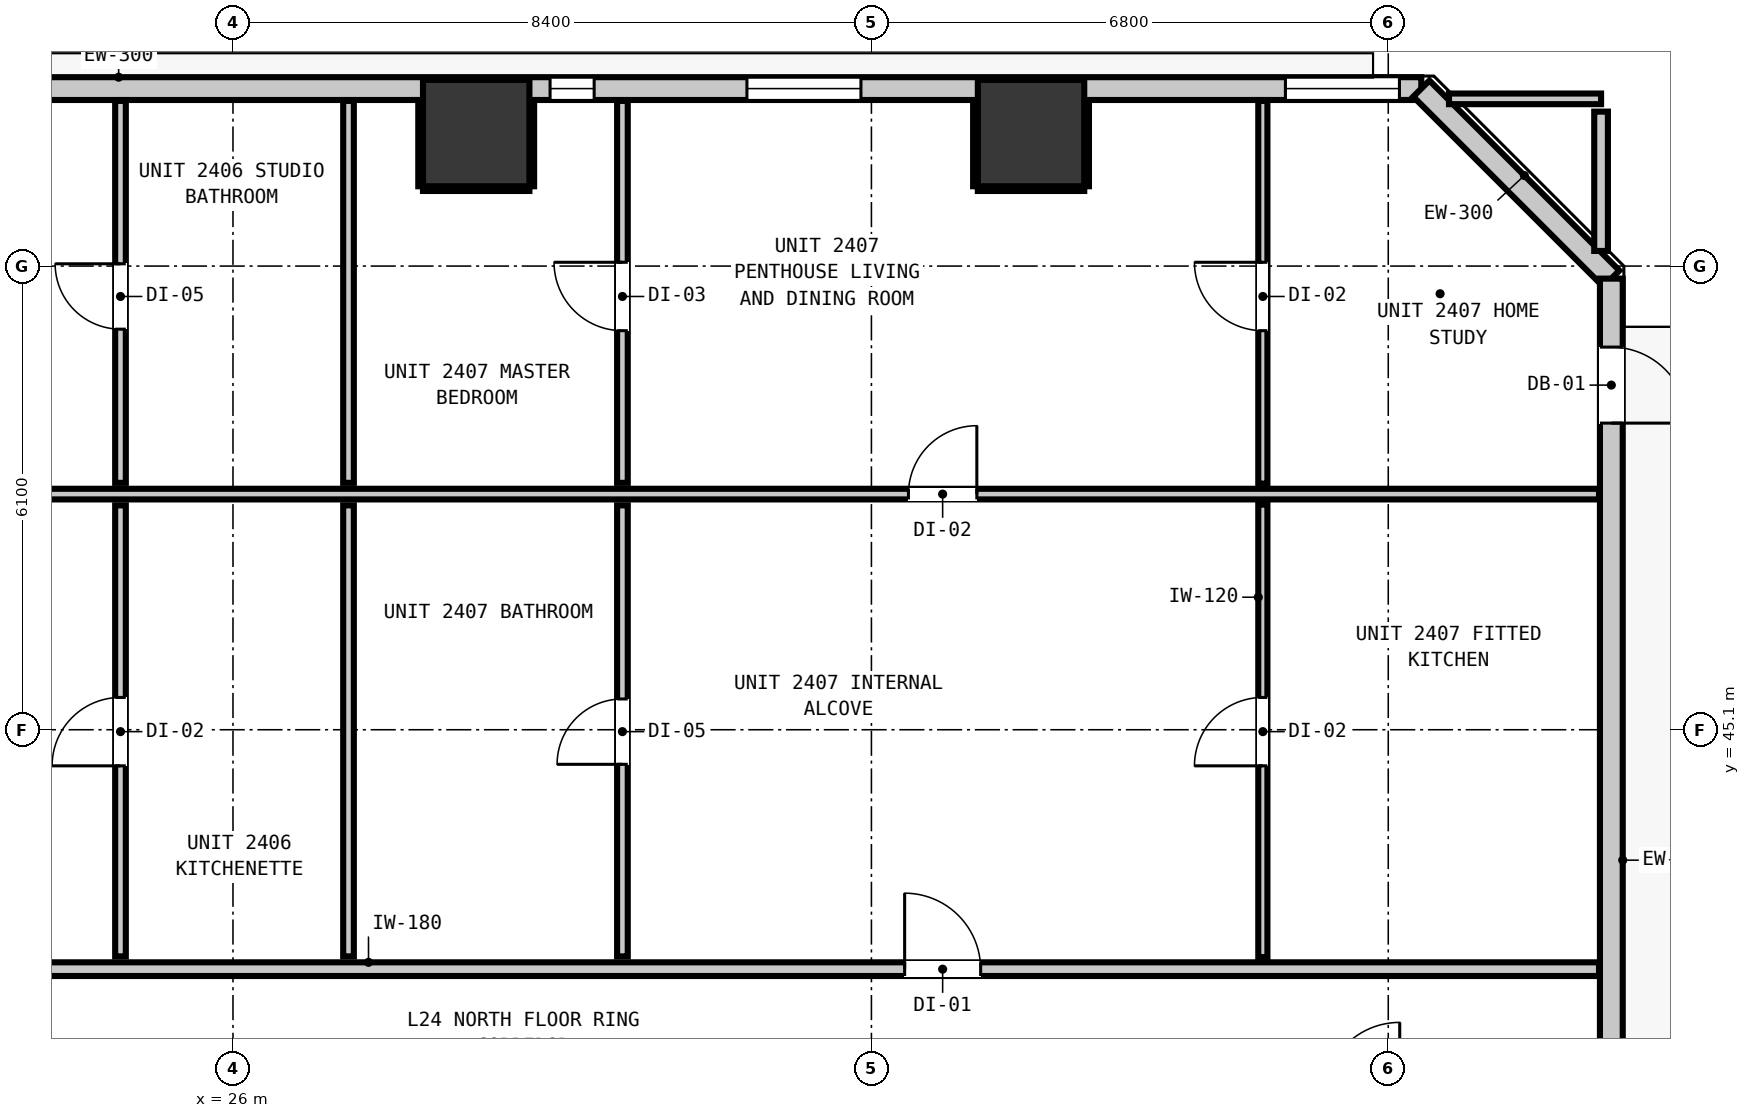
"""IFC4 building model, lengths in metres.
Left out: names, types, materials, properties, quantities, classifications, styles, units other than length and angle.
Written with IfcOpenShell. Run it as: python <this file> out.ifc"""

import sys

from ifc_helpers import new_model, si_unit, direction, frame, frame_2d, origin, origin_2d, place, context, subcontext, project, spatial, rectangle, extrude, element, fill, save


model = new_model("IFC4")
c1 = context("Model", 3, precision=1e-05, world=origin(), true_north=direction((0.0, 1.0)))
c2 = subcontext(c1, "Body", "Model", "MODEL_VIEW")
j1 = project(units=[si_unit("LENGTHUNIT", "METRE"), si_unit("PLANEANGLEUNIT", "RADIAN")], contexts=[c1])
p1 = place(None, origin())
s1 = spatial("IfcSite", under=j1, at=p1, CompositionType="ELEMENT")
p2 = place(p1, origin())
s2 = spatial("IfcBuilding", under=s1, at=p2, CompositionType="ELEMENT")
p3 = place(p2, frame((0.0, 0.0, 85.08)))
s3 = spatial("IfcBuildingStorey", under=s2, at=p3, CompositionType="ELEMENT", Elevation=85.08)
for number, where, z_axis, x_axis in (
    (1, (29.2, 52.95, 0.0), (0.0, 0.0, 1.0), (1.0, 0.0, 0.0)),
    (2, (36.5, 52.95, 0.0), (0.0, 0.0, 1.0), (1.0, 0.0, 0.0)),
):
    element("IfcColumn", number, at=place(p3, frame(where, z_axis=z_axis, x_axis=x_axis)), inside=s3, PredefinedType="COLUMN", context=c2, shape_type="SweptSolid", body=[
        extrude(rectangle(XDim=1.4, YDim=1.4, at=origin_2d()), origin(), (0.0, 0.0, 1.0), 3.32),
    ])
p4 = place(p3, frame((4.165, 53.535, 0.0), z_axis=(0.0, 0.0, 1.0), x_axis=(1.0, 0.0, 0.0)))
e3 = element("IfcWall", 3, at=p4, inside=s3, PredefinedType="STANDARD", context=c2, shape_type="SweptSolid", body=[
    extrude(rectangle(XDim=37.47, YDim=0.3, at=frame_2d((18.735, 0.0))), origin(), (0.0, 0.0, 1.0), 2.96),
])
p5 = place(p4, frame((1.951, 0.0, 0.0)))
e4 = element("IfcOpeningElement", 4, at=p5, cuts=e3, PredefinedType="OPENING", context=c2, shape_type="SweptSolid", body=[
    extrude(rectangle(XDim=1.0, YDim=2.15, at=frame_2d((0.5, 1.075))), frame((0.0, 0.16, 0.0), z_axis=(0.0, -1.0, 0.0), x_axis=(1.0, 0.0, 0.0)), (0.0, 0.0, 1.0), 0.32),
])
p6 = place(p4, frame((4.603, 0.0, 0.85)))
e5 = element("IfcOpeningElement", 5, at=p6, cuts=e3, PredefinedType="OPENING", context=c2, shape_type="SweptSolid", body=[
    extrude(rectangle(XDim=1.5, YDim=1.8, at=frame_2d((0.75, 0.9))), frame((0.0, 0.16, 0.0), z_axis=(0.0, -1.0, 0.0), x_axis=(1.0, 0.0, 0.0)), (0.0, 0.0, 1.0), 0.32),
])
p7 = place(p4, frame((0.324, 0.0, 0.85)))
e6 = element("IfcOpeningElement", 6, at=p7, cuts=e3, PredefinedType="OPENING", context=c2, shape_type="SweptSolid", body=[
    extrude(rectangle(XDim=0.58, YDim=1.5, at=frame_2d((0.29, 0.75))), frame((0.0, 0.16, 0.0), z_axis=(0.0, -1.0, 0.0), x_axis=(1.0, 0.0, 0.0)), (0.0, 0.0, 1.0), 0.32),
])
p8 = place(p4, frame((10.279, 0.0, 0.85)))
e7 = element("IfcOpeningElement", 7, at=p8, cuts=e3, PredefinedType="OPENING", context=c2, shape_type="SweptSolid", body=[
    extrude(rectangle(XDim=1.05, YDim=1.65, at=frame_2d((0.525, 0.825))), frame((0.0, 0.16, 0.0), z_axis=(0.0, -1.0, 0.0), x_axis=(1.0, 0.0, 0.0)), (0.0, 0.0, 1.0), 0.32),
])
p9 = place(p4, frame((13.154, 0.0, 0.85)))
e8 = element("IfcOpeningElement", 8, at=p9, cuts=e3, PredefinedType="OPENING", context=c2, shape_type="SweptSolid", body=[
    extrude(rectangle(XDim=1.5, YDim=1.8, at=frame_2d((0.75, 0.9))), frame((0.0, 0.16, 0.0), z_axis=(0.0, -1.0, 0.0), x_axis=(1.0, 0.0, 0.0)), (0.0, 0.0, 1.0), 0.32),
])
p10 = place(p4, frame((28.597, 0.0, 0.85)))
e9 = element("IfcOpeningElement", 9, at=p10, cuts=e3, PredefinedType="OPENING", context=c2, shape_type="SweptSolid", body=[
    extrude(rectangle(XDim=1.5, YDim=1.8, at=frame_2d((0.75, 0.9))), frame((0.0, 0.16, 0.0), z_axis=(0.0, -1.0, 0.0), x_axis=(1.0, 0.0, 0.0)), (0.0, 0.0, 1.0), 0.32),
])
p11 = place(p4, frame((26.007, 0.0, 0.85)))
e10 = element("IfcOpeningElement", 10, at=p11, cuts=e3, PredefinedType="OPENING", context=c2, shape_type="SweptSolid", body=[
    extrude(rectangle(XDim=0.58, YDim=1.5, at=frame_2d((0.29, 0.75))), frame((0.0, 0.16, 0.0), z_axis=(0.0, -1.0, 0.0), x_axis=(1.0, 0.0, 0.0)), (0.0, 0.0, 1.0), 0.32),
])
p12 = place(p4, frame((35.682, 0.0, 0.85)))
e11 = element("IfcOpeningElement", 11, at=p12, cuts=e3, PredefinedType="OPENING", context=c2, shape_type="SweptSolid", body=[
    extrude(rectangle(XDim=1.5, YDim=1.8, at=frame_2d((0.75, 0.9))), frame((0.0, 0.16, 0.0), z_axis=(0.0, -1.0, 0.0), x_axis=(1.0, 0.0, 0.0)), (0.0, 0.0, 1.0), 0.32),
])
p13 = place(p3, frame((41.635, 53.535, 0.0), z_axis=(0.0, 0.0, 1.0), x_axis=(0.707106781187, -0.707106781187, 0.0)))
e12 = element("IfcWall", 12, at=p13, inside=s3, PredefinedType="STANDARD", context=c2, shape_type="SweptSolid", body=[
    extrude(rectangle(XDim=3.536, YDim=0.3, at=frame_2d((1.768, 0.0))), origin(), (0.0, 0.0, 1.0), 2.96),
])
p14 = place(p3, frame((44.135, 51.035, 0.0), z_axis=(0.0, 0.0, 1.0), x_axis=(0.0, -1.0, 0.0)))
e13 = element("IfcWall", 13, at=p14, inside=s3, PredefinedType="STANDARD", context=c2, shape_type="SweptSolid", body=[
    extrude(rectangle(XDim=34.67, YDim=0.3, at=frame_2d((17.335, 0.0))), origin(), (0.0, 0.0, 1.0), 2.96),
])
p15 = place(p14, frame((0.901, 0.0, 0.0)))
e14 = element("IfcOpeningElement", 14, at=p15, cuts=e13, PredefinedType="OPENING", context=c2, shape_type="SweptSolid", body=[
    extrude(rectangle(XDim=1.0, YDim=2.15, at=frame_2d((0.5, 1.075))), frame((0.0, 0.16, 0.0), z_axis=(0.0, -1.0, 0.0), x_axis=(1.0, 0.0, 0.0)), (0.0, 0.0, 1.0), 0.32),
])
p16 = place(p14, frame((26.185, 0.0, 0.85)))
e15 = element("IfcOpeningElement", 15, at=p16, cuts=e13, PredefinedType="OPENING", context=c2, shape_type="SweptSolid", body=[
    extrude(rectangle(XDim=1.5, YDim=1.8, at=frame_2d((0.75, 0.9))), frame((0.0, 0.16, 0.0), z_axis=(0.0, -1.0, 0.0), x_axis=(1.0, 0.0, 0.0)), (0.0, 0.0, 1.0), 0.32),
])
p17 = place(p14, frame((13.401, 0.0, 0.85)))
e16 = element("IfcOpeningElement", 16, at=p17, cuts=e13, PredefinedType="OPENING", context=c2, shape_type="SweptSolid", body=[
    extrude(rectangle(XDim=1.5, YDim=1.8, at=frame_2d((0.75, 0.9))), frame((0.0, 0.16, 0.0), z_axis=(0.0, -1.0, 0.0), x_axis=(1.0, 0.0, 0.0)), (0.0, 0.0, 1.0), 0.32),
])
p18 = place(p3, frame((1.827, 41.95, 0.0), z_axis=(0.0, 0.0, 1.0), x_axis=(1.0, 0.0, 0.0)))
e17 = element("IfcWall", 17, at=p18, inside=s3, PredefinedType="PARTITIONING", context=c2, shape_type="SweptSolid", body=[
    extrude(rectangle(XDim=42.146, YDim=0.18, at=frame_2d((21.073, 0.0))), origin(), (0.0, 0.0, 1.0), 2.96),
])
p19 = place(p18, frame((8.668, 0.0, 0.0)))
e18 = element("IfcOpeningElement", 18, at=p19, cuts=e17, PredefinedType="OPENING", context=c2, shape_type="SweptSolid", body=[
    extrude(rectangle(XDim=1.0, YDim=2.15, at=frame_2d((0.5, 1.075))), frame((0.0, 0.1, 0.0), z_axis=(0.0, -1.0, 0.0), x_axis=(1.0, 0.0, 0.0)), (0.0, 0.0, 1.0), 0.2),
])
p20 = place(p18, frame((17.902, 0.0, 0.0)))
e19 = element("IfcOpeningElement", 19, at=p20, cuts=e17, PredefinedType="OPENING", context=c2, shape_type="SweptSolid", body=[
    extrude(rectangle(XDim=1.0, YDim=2.15, at=frame_2d((0.5, 1.075))), frame((0.0, 0.1, 0.0), z_axis=(0.0, -1.0, 0.0), x_axis=(1.0, 0.0, 0.0)), (0.0, 0.0, 1.0), 0.2),
])
p21 = place(p18, frame((33.01, 0.0, 0.0)))
e20 = element("IfcOpeningElement", 20, at=p21, cuts=e17, PredefinedType="OPENING", context=c2, shape_type="SweptSolid", body=[
    extrude(rectangle(XDim=1.0, YDim=2.15, at=frame_2d((0.5, 1.075))), frame((0.0, 0.1, 0.0), z_axis=(0.0, -1.0, 0.0), x_axis=(1.0, 0.0, 0.0)), (0.0, 0.0, 1.0), 0.2),
])
p22 = place(p3, frame((11.82, 48.2, 0.0), z_axis=(0.0, 0.0, 1.0), x_axis=(1.0, 0.0, 0.0)))
e21 = element("IfcWall", 21, at=p22, inside=s3, PredefinedType="PARTITIONING", context=c2, shape_type="SweptSolid", body=[
    extrude(rectangle(XDim=32.153, YDim=0.14, at=frame_2d((16.076, 0.0))), origin(), (0.0, 0.0, 1.0), 2.96),
])
p23 = place(p22, frame((7.959, 0.0, 0.0)))
e22 = element("IfcOpeningElement", 22, at=p23, cuts=e21, PredefinedType="OPENING", context=c2, shape_type="SweptSolid", body=[
    extrude(rectangle(XDim=0.9, YDim=2.1, at=frame_2d((0.45, 1.05))), frame((0.0, 0.08, 0.0), z_axis=(0.0, -1.0, 0.0), x_axis=(1.0, 0.0, 0.0)), (0.0, 0.0, 1.0), 0.16),
])
p24 = place(p22, frame((23.067, 0.0, 0.0)))
e23 = element("IfcOpeningElement", 23, at=p24, cuts=e21, PredefinedType="OPENING", context=c2, shape_type="SweptSolid", body=[
    extrude(rectangle(XDim=0.9, YDim=2.1, at=frame_2d((0.45, 1.05))), frame((0.0, 0.08, 0.0), z_axis=(0.0, -1.0, 0.0), x_axis=(1.0, 0.0, 0.0)), (0.0, 0.0, 1.0), 0.16),
])
p25 = place(p3, frame((41.999, 53.4, 0.0), z_axis=(0.0, 0.0, 1.0), x_axis=(1.0, 0.0, 0.0)))
e24 = element("IfcWall", 24, at=p25, inside=s3, PredefinedType="PARTITIONING", context=c2, shape_type="SweptSolid", body=[
    extrude(rectangle(XDim=2.001, YDim=0.14, at=frame_2d((1.0, 0.0))), origin(), (0.0, 0.0, 1.0), 2.96),
])
p26 = place(p3, frame((44.0, 51.399, 0.0), z_axis=(0.0, 0.0, 1.0), x_axis=(0.0, 1.0, 0.0)))
e25 = element("IfcWall", 25, at=p26, inside=s3, PredefinedType="PARTITIONING", context=c2, shape_type="SweptSolid", body=[
    extrude(rectangle(XDim=1.833, YDim=0.18, at=frame_2d((0.917, 0.0))), origin(), (0.0, 0.0, 1.0), 2.96),
])
p27 = place(p3, frame((24.52, 42.118, 0.0), z_axis=(0.0, 0.0, 1.0), x_axis=(0.0, 1.0, 0.0)))
e26 = element("IfcWall", 26, at=p27, inside=s3, PredefinedType="PARTITIONING", context=c2, shape_type="SweptSolid", body=[
    extrude(rectangle(XDim=5.934, YDim=0.14, at=frame_2d((2.967, 0.0))), origin(), (0.0, 0.0, 1.0), 2.96),
])
p28 = place(p27, frame((2.507, 0.0, 0.0)))
e27 = element("IfcOpeningElement", 27, at=p28, cuts=e26, PredefinedType="OPENING", context=c2, shape_type="SweptSolid", body=[
    extrude(rectangle(XDim=0.9, YDim=2.1, at=frame_2d((0.45, 1.05))), frame((0.0, 0.08, 0.0), z_axis=(0.0, -1.0, 0.0), x_axis=(1.0, 0.0, 0.0)), (0.0, 0.0, 1.0), 0.16),
])
p29 = place(p3, frame((24.52, 48.348, 0.0), z_axis=(0.0, 0.0, 1.0), x_axis=(0.0, 1.0, 0.0)))
e28 = element("IfcWall", 28, at=p29, inside=s3, PredefinedType="PARTITIONING", context=c2, shape_type="SweptSolid", body=[
    extrude(rectangle(XDim=5.025, YDim=0.14, at=frame_2d((2.513, 0.0))), origin(), (0.0, 0.0, 1.0), 2.96),
])
p30 = place(p29, frame((2.022, 0.0, 0.0)))
e29 = element("IfcOpeningElement", 29, at=p30, cuts=e28, PredefinedType="OPENING", context=c2, shape_type="SweptSolid", body=[
    extrude(rectangle(XDim=0.86, YDim=2.02, at=frame_2d((0.43, 1.01))), frame((0.0, 0.08, 0.0), z_axis=(0.0, -1.0, 0.0), x_axis=(1.0, 0.0, 0.0)), (0.0, 0.0, 1.0), 0.16),
])
p31 = place(p3, frame((27.52, 42.118, 0.0), z_axis=(0.0, 0.0, 1.0), x_axis=(0.0, 1.0, 0.0)))
e30 = element("IfcWall", 30, at=p31, inside=s3, PredefinedType="PARTITIONING", context=c2, shape_type="SweptSolid", body=[
    extrude(rectangle(XDim=5.934, YDim=0.14, at=frame_2d((2.967, 0.0))), origin(), (0.0, 0.0, 1.0), 2.96),
])
p32 = place(p3, frame((27.52, 48.348, 0.0), z_axis=(0.0, 0.0, 1.0), x_axis=(0.0, 1.0, 0.0)))
e31 = element("IfcWall", 31, at=p32, inside=s3, PredefinedType="PARTITIONING", context=c2, shape_type="SweptSolid", body=[
    extrude(rectangle(XDim=5.025, YDim=0.14, at=frame_2d((2.513, 0.0))), origin(), (0.0, 0.0, 1.0), 2.96),
])
p33 = place(p3, frame((31.124, 42.118, 0.0), z_axis=(0.0, 0.0, 1.0), x_axis=(0.0, 1.0, 0.0)))
e32 = element("IfcWall", 32, at=p33, inside=s3, PredefinedType="PARTITIONING", context=c2, shape_type="SweptSolid", body=[
    extrude(rectangle(XDim=5.934, YDim=0.14, at=frame_2d((2.967, 0.0))), origin(), (0.0, 0.0, 1.0), 2.96),
])
p34 = place(p33, frame((2.527, 0.0, 0.0)))
e33 = element("IfcOpeningElement", 33, at=p34, cuts=e32, PredefinedType="OPENING", context=c2, shape_type="SweptSolid", body=[
    extrude(rectangle(XDim=0.86, YDim=2.02, at=frame_2d((0.43, 1.01))), frame((0.0, 0.08, 0.0), z_axis=(0.0, -1.0, 0.0), x_axis=(1.0, 0.0, 0.0)), (0.0, 0.0, 1.0), 0.16),
])
p35 = place(p3, frame((31.124, 48.348, 0.0), z_axis=(0.0, 0.0, 1.0), x_axis=(0.0, 1.0, 0.0)))
e34 = element("IfcWall", 34, at=p35, inside=s3, PredefinedType="PARTITIONING", context=c2, shape_type="SweptSolid", body=[
    extrude(rectangle(XDim=5.025, YDim=0.14, at=frame_2d((2.513, 0.0))), origin(), (0.0, 0.0, 1.0), 2.96),
])
p36 = place(p35, frame((2.002, 0.0, 0.0)))
e35 = element("IfcOpeningElement", 35, at=p36, cuts=e34, PredefinedType="OPENING", context=c2, shape_type="SweptSolid", body=[
    extrude(rectangle(XDim=0.9, YDim=2.1, at=frame_2d((0.45, 1.05))), frame((0.0, 0.08, 0.0), z_axis=(0.0, -1.0, 0.0), x_axis=(1.0, 0.0, 0.0)), (0.0, 0.0, 1.0), 0.16),
])
p37 = place(p3, frame((39.55, 42.108, 0.0), z_axis=(0.0, 0.0, 1.0), x_axis=(0.0, 1.0, 0.0)))
e36 = element("IfcWall", 36, at=p37, inside=s3, PredefinedType="PARTITIONING", context=c2, shape_type="SweptSolid", body=[
    extrude(rectangle(XDim=5.954, YDim=0.12, at=frame_2d((2.977, 0.0))), origin(), (0.0, 0.0, 1.0), 2.345),
])
p38 = place(p37, frame((2.517, 0.0, 0.0)))
e37 = element("IfcOpeningElement", 37, at=p38, cuts=e36, PredefinedType="OPENING", context=c2, shape_type="SweptSolid", body=[
    extrude(rectangle(XDim=0.9, YDim=2.1, at=frame_2d((0.45, 1.05))), frame((0.0, 0.07, 0.0), z_axis=(0.0, -1.0, 0.0), x_axis=(1.0, 0.0, 0.0)), (0.0, 0.0, 1.0), 0.14),
])
p39 = place(p3, frame((39.55, 48.338, 0.0), z_axis=(0.0, 0.0, 1.0), x_axis=(0.0, 1.0, 0.0)))
e38 = element("IfcWall", 38, at=p39, inside=s3, PredefinedType="PARTITIONING", context=c2, shape_type="SweptSolid", body=[
    extrude(rectangle(XDim=5.035, YDim=0.12, at=frame_2d((2.518, 0.0))), origin(), (0.0, 0.0, 1.0), 2.96),
])
p40 = place(p39, frame((2.012, 0.0, 0.0)))
e39 = element("IfcOpeningElement", 39, at=p40, cuts=e38, PredefinedType="OPENING", context=c2, shape_type="SweptSolid", body=[
    extrude(rectangle(XDim=0.9, YDim=2.1, at=frame_2d((0.45, 1.05))), frame((0.0, 0.07, 0.0), z_axis=(0.0, -1.0, 0.0), x_axis=(1.0, 0.0, 0.0)), (0.0, 0.0, 1.0), 0.14),
])
p41 = place(p3, frame((28.5, 52.218, 0.0), z_axis=(0.0, 0.0, 1.0), x_axis=(1.0, 0.0, 0.0)))
e40 = element("IfcWall", 40, at=p41, inside=s3, PredefinedType="PARTITIONING", context=c2, shape_type="SweptSolid", body=[
    extrude(rectangle(XDim=1.4, YDim=0.06, at=frame_2d((0.7, 0.0))), origin(), (0.0, 0.0, 1.0), 1.45),
])
for number, where, z_axis, x_axis in (
    (41, (28.468, 52.25, 0.0), (0.0, 0.0, 1.0), (0.0, 1.0, 0.0)),
    (42, (29.932, 52.25, 0.0), (0.0, 0.0, 1.0), (0.0, 1.0, 0.0)),
):
    element("IfcWall", number, at=place(p3, frame(where, z_axis=z_axis, x_axis=x_axis)), inside=s3, PredefinedType="PARTITIONING", context=c2, shape_type="SweptSolid", body=[
        extrude(rectangle(XDim=1.12, YDim=0.06, at=frame_2d((0.56, 0.0))), origin(), (0.0, 0.0, 1.0), 1.45),
    ])
p42 = place(p3, frame((35.8, 52.218, 0.0), z_axis=(0.0, 0.0, 1.0), x_axis=(1.0, 0.0, 0.0)))
e43 = element("IfcWall", 43, at=p42, inside=s3, PredefinedType="PARTITIONING", context=c2, shape_type="SweptSolid", body=[
    extrude(rectangle(XDim=1.4, YDim=0.06, at=frame_2d((0.7, 0.0))), origin(), (0.0, 0.0, 1.0), 1.45),
])
for number, where, z_axis, x_axis in (
    (44, (35.768, 52.25, 0.0), (0.0, 0.0, 1.0), (0.0, 1.0, 0.0)),
    (45, (37.232, 52.25, 0.0), (0.0, 0.0, 1.0), (0.0, 1.0, 0.0)),
):
    element("IfcWall", number, at=place(p3, frame(where, z_axis=z_axis, x_axis=x_axis)), inside=s3, PredefinedType="PARTITIONING", context=c2, shape_type="SweptSolid", body=[
        extrude(rectangle(XDim=1.12, YDim=0.06, at=frame_2d((0.56, 0.0))), origin(), (0.0, 0.0, 1.0), 1.45),
    ])
p43 = place(p15, origin())
e46 = element("IfcDoor", 46, at=p43, inside=s3, OperationType="SINGLE_SWING_RIGHT", PredefinedType="DOOR", context=c2, shape_type="SweptSolid", body=[
    extrude(rectangle(XDim=1.0, YDim=2.15, at=frame_2d((0.5, 1.075))), frame((0.0, 0.025, 0.0), z_axis=(0.0, -1.0, 0.0), x_axis=(1.0, 0.0, 0.0)), (0.0, 0.0, 1.0), 0.05),
])
fill(e14, e46)
p44 = place(p10, origin())
e47 = element("IfcWindow", 47, at=p44, inside=s3, PartitioningType="SINGLE_PANEL", PredefinedType="WINDOW", context=c2, shape_type="SweptSolid", body=[
    extrude(rectangle(XDim=1.5, YDim=1.8, at=frame_2d((0.75, 0.9))), frame((0.0, 0.03, 0.0), z_axis=(0.0, -1.0, 0.0), x_axis=(1.0, 0.0, 0.0)), (0.0, 0.0, 1.0), 0.06),
])
fill(e9, e47)
p45 = place(p11, origin())
e48 = element("IfcWindow", 48, at=p45, inside=s3, PartitioningType="SINGLE_PANEL", PredefinedType="WINDOW", context=c2, shape_type="SweptSolid", body=[
    extrude(rectangle(XDim=0.58, YDim=1.5, at=frame_2d((0.29, 0.75))), frame((0.0, 0.03, 0.0), z_axis=(0.0, -1.0, 0.0), x_axis=(1.0, 0.0, 0.0)), (0.0, 0.0, 1.0), 0.06),
])
fill(e10, e48)
p46 = place(p12, origin())
e49 = element("IfcWindow", 49, at=p46, inside=s3, PartitioningType="SINGLE_PANEL", PredefinedType="WINDOW", context=c2, shape_type="SweptSolid", body=[
    extrude(rectangle(XDim=1.5, YDim=1.8, at=frame_2d((0.75, 0.9))), frame((0.0, 0.03, 0.0), z_axis=(0.0, -1.0, 0.0), x_axis=(1.0, 0.0, 0.0)), (0.0, 0.0, 1.0), 0.06),
])
fill(e11, e49)
p47 = place(p28, origin())
e50 = element("IfcDoor", 50, at=p47, inside=s3, OperationType="SINGLE_SWING_LEFT", PredefinedType="DOOR", context=c2, shape_type="SweptSolid", body=[
    extrude(rectangle(XDim=0.9, YDim=2.1, at=frame_2d((0.45, 1.05))), frame((0.0, 0.025, 0.0), z_axis=(0.0, -1.0, 0.0), x_axis=(1.0, 0.0, 0.0)), (0.0, 0.0, 1.0), 0.05),
])
fill(e27, e50)
p48 = place(p30, origin())
e51 = element("IfcDoor", 51, at=p48, inside=s3, OperationType="SINGLE_SWING_RIGHT", PredefinedType="DOOR", context=c2, shape_type="SweptSolid", body=[
    extrude(rectangle(XDim=0.86, YDim=2.02, at=frame_2d((0.43, 1.01))), frame((0.0, 0.025, 0.0), z_axis=(0.0, -1.0, 0.0), x_axis=(1.0, 0.0, 0.0)), (0.0, 0.0, 1.0), 0.05),
])
fill(e29, e51)
p49 = place(p21, origin())
e52 = element("IfcDoor", 52, at=p49, inside=s3, OperationType="SINGLE_SWING_LEFT", PredefinedType="DOOR", context=c2, shape_type="SweptSolid", body=[
    extrude(rectangle(XDim=1.0, YDim=2.15, at=frame_2d((0.5, 1.075))), frame((0.0, 0.025, 0.0), z_axis=(0.0, -1.0, 0.0), x_axis=(1.0, 0.0, 0.0)), (0.0, 0.0, 1.0), 0.05),
])
fill(e20, e52)
p50 = place(p24, origin())
e53 = element("IfcDoor", 53, at=p50, inside=s3, OperationType="SINGLE_SWING_RIGHT", PredefinedType="DOOR", context=c2, shape_type="SweptSolid", body=[
    extrude(rectangle(XDim=0.9, YDim=2.1, at=frame_2d((0.45, 1.05))), frame((0.0, 0.025, 0.0), z_axis=(0.0, -1.0, 0.0), x_axis=(1.0, 0.0, 0.0)), (0.0, 0.0, 1.0), 0.05),
])
fill(e23, e53)
p51 = place(p34, origin())
e54 = element("IfcDoor", 54, at=p51, inside=s3, OperationType="SINGLE_SWING_LEFT", PredefinedType="DOOR", context=c2, shape_type="SweptSolid", body=[
    extrude(rectangle(XDim=0.86, YDim=2.02, at=frame_2d((0.43, 1.01))), frame((0.0, 0.025, 0.0), z_axis=(0.0, -1.0, 0.0), x_axis=(1.0, 0.0, 0.0)), (0.0, 0.0, 1.0), 0.05),
])
fill(e33, e54)
p52 = place(p36, origin())
e55 = element("IfcDoor", 55, at=p52, inside=s3, OperationType="SINGLE_SWING_RIGHT", PredefinedType="DOOR", context=c2, shape_type="SweptSolid", body=[
    extrude(rectangle(XDim=0.9, YDim=2.1, at=frame_2d((0.45, 1.05))), frame((0.0, 0.025, 0.0), z_axis=(0.0, -1.0, 0.0), x_axis=(1.0, 0.0, 0.0)), (0.0, 0.0, 1.0), 0.05),
])
fill(e35, e55)
p53 = place(p38, origin())
e56 = element("IfcDoor", 56, at=p53, inside=s3, OperationType="SINGLE_SWING_LEFT", PredefinedType="DOOR", context=c2, shape_type="SweptSolid", body=[
    extrude(rectangle(XDim=0.9, YDim=2.1, at=frame_2d((0.45, 1.05))), frame((0.0, 0.025, 0.0), z_axis=(0.0, -1.0, 0.0), x_axis=(1.0, 0.0, 0.0)), (0.0, 0.0, 1.0), 0.05),
])
fill(e37, e56)
p54 = place(p40, origin())
e57 = element("IfcDoor", 57, at=p54, inside=s3, OperationType="SINGLE_SWING_RIGHT", PredefinedType="DOOR", context=c2, shape_type="SweptSolid", body=[
    extrude(rectangle(XDim=0.9, YDim=2.1, at=frame_2d((0.45, 1.05))), frame((0.0, 0.025, 0.0), z_axis=(0.0, -1.0, 0.0), x_axis=(1.0, 0.0, 0.0)), (0.0, 0.0, 1.0), 0.05),
])
fill(e39, e57)
save(model, sys.argv[1])
